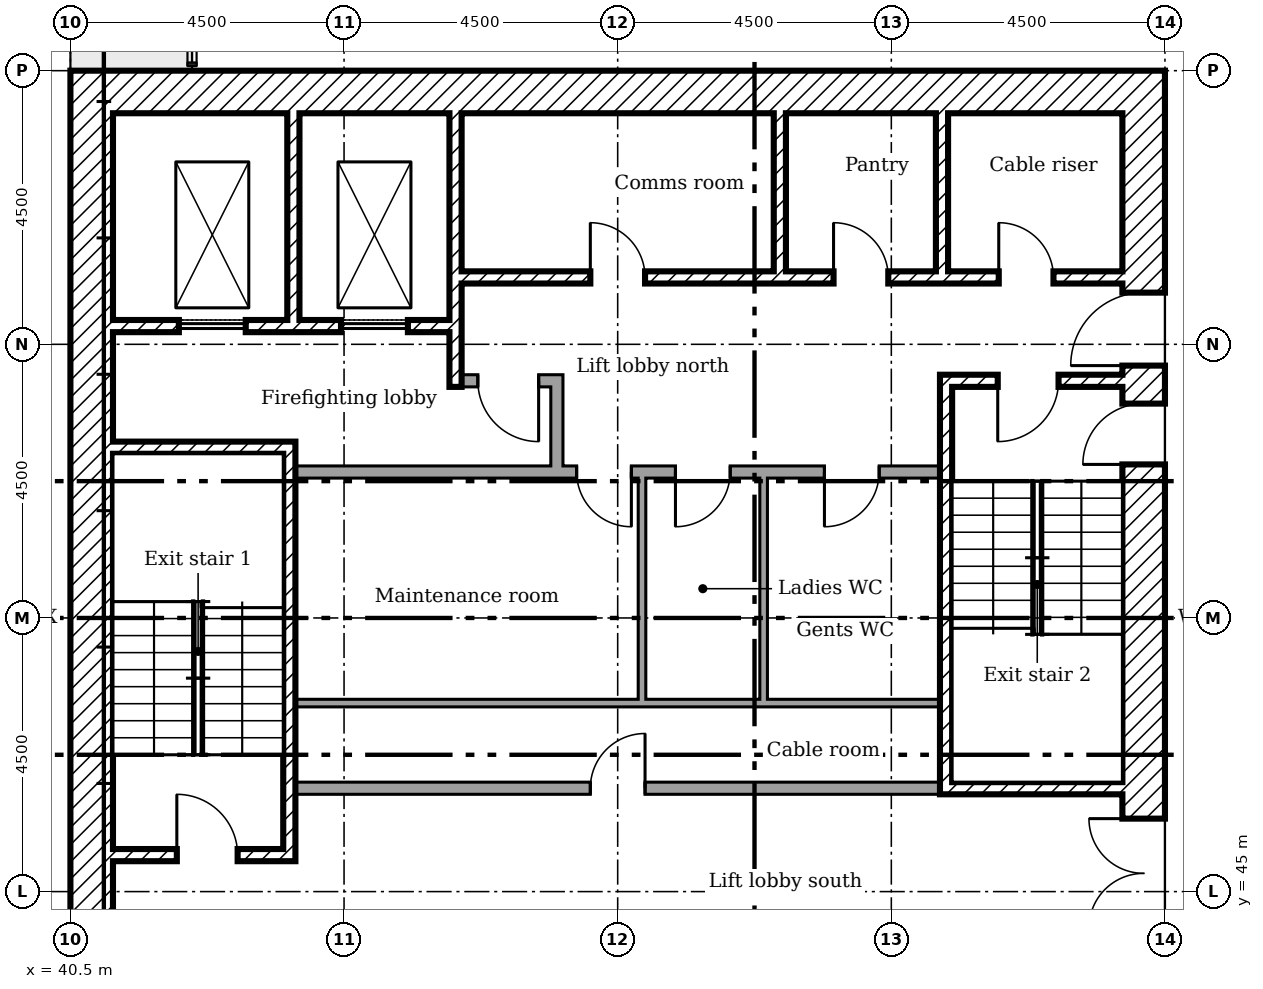
"""IFC4 building model, lengths in metres.
Left out: names, types, materials, properties, quantities, classifications, styles, units other than length and angle.
Written with IfcOpenShell. Run it as: python <this file> out.ifc"""

import sys

from ifc_helpers import new_model, si_unit, direction, frame, frame_2d, origin, place, context, subcontext, project, spatial, rectangle, extrude, element, fill, save


model = new_model("IFC4")
c1 = context("Model", 3, precision=1e-05, world=origin(), true_north=direction((0.0, 1.0)))
c2 = subcontext(c1, "Body", "Model", "MODEL_VIEW")
j1 = project(units=[si_unit("LENGTHUNIT", "METRE"), si_unit("PLANEANGLEUNIT", "RADIAN")], contexts=[c1])
p1 = place(None, origin())
s1 = spatial("IfcSite", under=j1, at=p1, CompositionType="ELEMENT")
p2 = place(p1, origin())
s2 = spatial("IfcBuilding", under=s1, at=p2, CompositionType="ELEMENT")
p3 = place(p2, frame((0.0, 0.0, 102.8)))
s3 = spatial("IfcBuildingStorey", under=s2, at=p3, CompositionType="ELEMENT", Elevation=102.8)
p4 = place(p3, frame((58.15, 40.5, 0.0), z_axis=(0.0, 0.0, 1.0), x_axis=(0.0, 1.0, 0.0)))
e1 = element("IfcWall", 1, at=p4, inside=s3, PredefinedType="SHEAR", context=c2, shape_type="SweptSolid", body=[
    extrude(rectangle(XDim=18.0, YDim=0.7, at=frame_2d((9.0, 0.0))), origin(), (0.0, 0.0, 1.0), 3.35),
])
p5 = place(p4, frame((13.15, 0.0, 0.0)))
e2 = element("IfcOpeningElement", 2, at=p5, cuts=e1, PredefinedType="OPENING", context=c2, shape_type="SweptSolid", body=[
    extrude(rectangle(XDim=1.2, YDim=2.1, at=frame_2d((0.6, 1.05))), frame((0.0, 0.36, 0.0), z_axis=(0.0, -1.0, 0.0), x_axis=(1.0, 0.0, 0.0)), (0.0, 0.0, 1.0), 0.72),
])
p6 = place(p4, frame((3.9, 0.0, 0.0)))
e3 = element("IfcOpeningElement", 3, at=p6, cuts=e1, PredefinedType="OPENING", context=c2, shape_type="SweptSolid", body=[
    extrude(rectangle(XDim=1.8, YDim=2.1, at=frame_2d((0.9, 1.05))), frame((0.0, 0.36, 0.0), z_axis=(0.0, -1.0, 0.0), x_axis=(1.0, 0.0, 0.0)), (0.0, 0.0, 1.0), 0.72),
])
p7 = place(p4, frame((11.525, 0.0, 0.0)))
e4 = element("IfcOpeningElement", 4, at=p7, cuts=e1, PredefinedType="OPENING", context=c2, shape_type="SweptSolid", body=[
    extrude(rectangle(XDim=1.0, YDim=2.1, at=frame_2d((0.5, 1.05))), frame((0.0, 0.36, 0.0), z_axis=(0.0, -1.0, 0.0), x_axis=(1.0, 0.0, 0.0)), (0.0, 0.0, 1.0), 0.72),
])
p8 = place(p3, frame((41.2, 58.15, 0.0)))
e5 = element("IfcWall", 5, at=p8, inside=s3, PredefinedType="SHEAR", context=c2, shape_type="SweptSolid", body=[
    extrude(rectangle(XDim=16.6, YDim=0.7, at=frame_2d((8.3, 0.0))), origin(), (0.0, 0.0, 1.0), 3.35),
])
p9 = place(p3, frame((40.85, 40.5, 0.0), z_axis=(0.0, 0.0, 1.0), x_axis=(0.0, 1.0, 0.0)))
e6 = element("IfcWall", 6, at=p9, inside=s3, PredefinedType="SHEAR", context=c2, shape_type="SweptSolid", body=[
    extrude(rectangle(XDim=18.0, YDim=0.7, at=frame_2d((9.0, 0.0))), origin(), (0.0, 0.0, 1.0), 3.35),
])
p10 = place(p3, frame((44.167, 57.8, 0.0), z_axis=(0.0, 0.0, 1.0), x_axis=(0.0, -1.0, 0.0)))
e7 = element("IfcWall", 7, at=p10, inside=s3, PredefinedType="SHEAR", context=c2, shape_type="SweptSolid", body=[
    extrude(rectangle(XDim=3.4, YDim=0.2, at=frame_2d((1.7, 0.0))), origin(), (0.0, 0.0, 1.0), 3.35),
])
p11 = place(p3, frame((46.833, 57.8, 0.0), z_axis=(0.0, 0.0, 1.0), x_axis=(0.0, -1.0, 0.0)))
e8 = element("IfcWall", 8, at=p11, inside=s3, PredefinedType="SHEAR", context=c2, shape_type="SweptSolid", body=[
    extrude(rectangle(XDim=4.5, YDim=0.2, at=frame_2d((2.25, 0.0))), origin(), (0.0, 0.0, 1.0), 3.35),
])
for number, where, z_axis, x_axis in (
    (9, (52.167, 57.8, 0.0), (0.0, 0.0, 1.0), (0.0, -1.0, 0.0)),
    (10, (54.833, 57.8, 0.0), (0.0, 0.0, 1.0), (0.0, -1.0, 0.0)),
):
    element("IfcWall", number, at=place(p3, frame(where, z_axis=z_axis, x_axis=x_axis)), inside=s3, PredefinedType="SHEAR", context=c2, shape_type="SweptSolid", body=[
        extrude(rectangle(XDim=2.6, YDim=0.2, at=frame_2d((1.3, 0.0))), origin(), (0.0, 0.0, 1.0), 3.35),
    ])
p12 = place(p3, frame((48.5, 51.9, 0.0), z_axis=(0.0, 0.0, 1.0), x_axis=(0.0, 1.0, 0.0)))
e11 = element("IfcWall", 11, at=p12, inside=s3, PredefinedType="PARTITIONING", context=c2, shape_type="SweptSolid", body=[
    extrude(rectangle(XDim=1.6, YDim=0.2, at=frame_2d((0.8, 0.0))), origin(), (0.0, 0.0, 1.0), 3.35),
])
p13 = place(p3, frame((46.933, 53.4, 0.0)))
e12 = element("IfcWall", 12, at=p13, inside=s3, PredefinedType="PARTITIONING", context=c2, shape_type="SweptSolid", body=[
    extrude(rectangle(XDim=1.467, YDim=0.2, at=frame_2d((0.733, 0.0))), origin(), (0.0, 0.0, 1.0), 3.35),
])
p14 = place(p13, frame((0.267, 0.0, 0.0)))
e13 = element("IfcOpeningElement", 13, at=p14, cuts=e12, PredefinedType="OPENING", context=c2, shape_type="SweptSolid", body=[
    extrude(rectangle(XDim=1.0, YDim=2.1, at=frame_2d((0.5, 1.05))), frame((0.0, 0.11, 0.0), z_axis=(0.0, -1.0, 0.0), x_axis=(1.0, 0.0, 0.0)), (0.0, 0.0, 1.0), 0.22),
])
p15 = place(p3, frame((46.933, 55.1, 0.0)))
e14 = element("IfcWall", 14, at=p15, inside=s3, PredefinedType="SHEAR", context=c2, shape_type="SweptSolid", body=[
    extrude(rectangle(XDim=10.867, YDim=0.2, at=frame_2d((5.433, 0.0))), origin(), (0.0, 0.0, 1.0), 3.35),
])
p16 = place(p15, frame((8.833, 0.0, 0.0)))
e15 = element("IfcOpeningElement", 15, at=p16, cuts=e14, PredefinedType="OPENING", context=c2, shape_type="SweptSolid", body=[
    extrude(rectangle(XDim=0.9, YDim=2.1, at=frame_2d((0.45, 1.05))), frame((0.0, 0.11, 0.0), z_axis=(0.0, -1.0, 0.0), x_axis=(1.0, 0.0, 0.0)), (0.0, 0.0, 1.0), 0.22),
])
p17 = place(p15, frame((2.117, 0.0, 0.0)))
e16 = element("IfcOpeningElement", 16, at=p17, cuts=e14, PredefinedType="OPENING", context=c2, shape_type="SweptSolid", body=[
    extrude(rectangle(XDim=0.9, YDim=2.1, at=frame_2d((0.45, 1.05))), frame((0.0, 0.11, 0.0), z_axis=(0.0, -1.0, 0.0), x_axis=(1.0, 0.0, 0.0)), (0.0, 0.0, 1.0), 0.22),
])
p18 = place(p15, frame((6.117, 0.0, 0.0)))
e17 = element("IfcOpeningElement", 17, at=p18, cuts=e14, PredefinedType="OPENING", context=c2, shape_type="SweptSolid", body=[
    extrude(rectangle(XDim=0.9, YDim=2.1, at=frame_2d((0.45, 1.05))), frame((0.0, 0.11, 0.0), z_axis=(0.0, -1.0, 0.0), x_axis=(1.0, 0.0, 0.0)), (0.0, 0.0, 1.0), 0.22),
])
p19 = place(p3, frame((41.2, 54.3, 0.0)))
e18 = element("IfcWall", 18, at=p19, inside=s3, PredefinedType="SHEAR", context=c2, shape_type="SweptSolid", body=[
    extrude(rectangle(XDim=5.533, YDim=0.2, at=frame_2d((2.767, 0.0))), origin(), (0.0, 0.0, 1.0), 3.35),
])
p20 = place(p19, frame((1.083, 0.0, 0.0)))
e19 = element("IfcOpeningElement", 19, at=p20, cuts=e18, PredefinedType="OPENING", context=c2, shape_type="SweptSolid", body=[
    extrude(rectangle(XDim=1.1, YDim=2.1, at=frame_2d((0.55, 1.05))), frame((0.0, 0.11, 0.0), z_axis=(0.0, -1.0, 0.0), x_axis=(1.0, 0.0, 0.0)), (0.0, 0.0, 1.0), 0.22),
])
p21 = place(p19, frame((3.75, 0.0, 0.0)))
e20 = element("IfcOpeningElement", 20, at=p21, cuts=e18, PredefinedType="OPENING", context=c2, shape_type="SweptSolid", body=[
    extrude(rectangle(XDim=1.1, YDim=2.1, at=frame_2d((0.55, 1.05))), frame((0.0, 0.11, 0.0), z_axis=(0.0, -1.0, 0.0), x_axis=(1.0, 0.0, 0.0)), (0.0, 0.0, 1.0), 0.22),
])
p22 = place(p3, frame((44.1, 45.5, 0.0), z_axis=(0.0, 0.0, 1.0), x_axis=(0.0, 1.0, 0.0)))
e21 = element("IfcWall", 21, at=p22, inside=s3, PredefinedType="SHEAR", context=c2, shape_type="SweptSolid", body=[
    extrude(rectangle(XDim=6.9, YDim=0.2, at=frame_2d((3.45, 0.0))), origin(), (0.0, 0.0, 1.0), 3.35),
])
p23 = place(p3, frame((41.2, 52.3, 0.0)))
e22 = element("IfcWall", 22, at=p23, inside=s3, PredefinedType="SHEAR", context=c2, shape_type="SweptSolid", body=[
    extrude(rectangle(XDim=2.8, YDim=0.2, at=frame_2d((1.4, 0.0))), origin(), (0.0, 0.0, 1.0), 3.35),
])
p24 = place(p3, frame((41.2, 45.6, 0.0)))
e23 = element("IfcWall", 23, at=p24, inside=s3, PredefinedType="SHEAR", context=c2, shape_type="SweptSolid", body=[
    extrude(rectangle(XDim=2.8, YDim=0.2, at=frame_2d((1.4, 0.0))), origin(), (0.0, 0.0, 1.0), 3.35),
])
p25 = place(p24, frame((1.05, 0.0, 0.0)))
e24 = element("IfcOpeningElement", 24, at=p25, cuts=e23, PredefinedType="OPENING", context=c2, shape_type="SweptSolid", body=[
    extrude(rectangle(XDim=1.0, YDim=2.1, at=frame_2d((0.5, 1.05))), frame((0.0, 0.11, 0.0), z_axis=(0.0, -1.0, 0.0), x_axis=(1.0, 0.0, 0.0)), (0.0, 0.0, 1.0), 0.22),
])
p26 = place(p3, frame((54.8, 53.4, 0.0)))
e25 = element("IfcWall", 25, at=p26, inside=s3, PredefinedType="SHEAR", context=c2, shape_type="SweptSolid", body=[
    extrude(rectangle(XDim=3.0, YDim=0.2, at=frame_2d((1.5, 0.0))), origin(), (0.0, 0.0, 1.0), 3.35),
])
p27 = place(p26, frame((0.95, 0.0, 0.0)))
e26 = element("IfcOpeningElement", 26, at=p27, cuts=e25, PredefinedType="OPENING", context=c2, shape_type="SweptSolid", body=[
    extrude(rectangle(XDim=1.0, YDim=2.1, at=frame_2d((0.5, 1.05))), frame((0.0, 0.11, 0.0), z_axis=(0.0, -1.0, 0.0), x_axis=(1.0, 0.0, 0.0)), (0.0, 0.0, 1.0), 0.22),
])
p28 = place(p3, frame((54.8, 46.7, 0.0)))
e27 = element("IfcWall", 27, at=p28, inside=s3, PredefinedType="SHEAR", context=c2, shape_type="SweptSolid", body=[
    extrude(rectangle(XDim=3.0, YDim=0.2, at=frame_2d((1.5, 0.0))), origin(), (0.0, 0.0, 1.0), 3.35),
])
p29 = place(p3, frame((54.9, 46.8, 0.0), z_axis=(0.0, 0.0, 1.0), x_axis=(0.0, 1.0, 0.0)))
e28 = element("IfcWall", 28, at=p29, inside=s3, PredefinedType="SHEAR", context=c2, shape_type="SweptSolid", body=[
    extrude(rectangle(XDim=6.5, YDim=0.2, at=frame_2d((3.25, 0.0))), origin(), (0.0, 0.0, 1.0), 3.35),
])
p30 = place(p3, frame((44.2, 51.9, 0.0)))
e29 = element("IfcWall", 29, at=p30, inside=s3, PredefinedType="PARTITIONING", context=c2, shape_type="SweptSolid", body=[
    extrude(rectangle(XDim=10.6, YDim=0.2, at=frame_2d((5.3, 0.0))), origin(), (0.0, 0.0, 1.0), 3.35),
])
p31 = place(p30, frame((4.625, 0.0, 0.0)))
e30 = element("IfcOpeningElement", 30, at=p31, cuts=e29, PredefinedType="OPENING", context=c2, shape_type="SweptSolid", body=[
    extrude(rectangle(XDim=0.9, YDim=2.1, at=frame_2d((0.45, 1.05))), frame((0.0, 0.11, 0.0), z_axis=(0.0, -1.0, 0.0), x_axis=(1.0, 0.0, 0.0)), (0.0, 0.0, 1.0), 0.22),
])
p32 = place(p30, frame((6.25, 0.0, 0.0)))
e31 = element("IfcOpeningElement", 31, at=p32, cuts=e29, PredefinedType="OPENING", context=c2, shape_type="SweptSolid", body=[
    extrude(rectangle(XDim=0.9, YDim=2.1, at=frame_2d((0.45, 1.05))), frame((0.0, 0.11, 0.0), z_axis=(0.0, -1.0, 0.0), x_axis=(1.0, 0.0, 0.0)), (0.0, 0.0, 1.0), 0.22),
])
p33 = place(p30, frame((8.7, 0.0, 0.0)))
e32 = element("IfcOpeningElement", 32, at=p33, cuts=e29, PredefinedType="OPENING", context=c2, shape_type="SweptSolid", body=[
    extrude(rectangle(XDim=0.9, YDim=2.1, at=frame_2d((0.45, 1.05))), frame((0.0, 0.11, 0.0), z_axis=(0.0, -1.0, 0.0), x_axis=(1.0, 0.0, 0.0)), (0.0, 0.0, 1.0), 0.22),
])
p34 = place(p3, frame((44.2, 46.7, 0.0)))
e33 = element("IfcWall", 33, at=p34, inside=s3, PredefinedType="PARTITIONING", context=c2, shape_type="SweptSolid", body=[
    extrude(rectangle(XDim=10.6, YDim=0.2, at=frame_2d((5.3, 0.0))), origin(), (0.0, 0.0, 1.0), 3.35),
])
p35 = place(p34, frame((4.85, 0.0, 0.0)))
e34 = element("IfcOpeningElement", 34, at=p35, cuts=e33, PredefinedType="OPENING", context=c2, shape_type="SweptSolid", body=[
    extrude(rectangle(XDim=0.9, YDim=2.1, at=frame_2d((0.45, 1.05))), frame((0.0, 0.11, 0.0), z_axis=(0.0, -1.0, 0.0), x_axis=(1.0, 0.0, 0.0)), (0.0, 0.0, 1.0), 0.22),
])
p36 = place(p3, frame((49.962, 48.1, 0.0), z_axis=(0.0, 0.0, 1.0), x_axis=(-1.0, 0.0, 0.0)))
e35 = element("IfcWall", 35, at=p36, inside=s3, PredefinedType="PARTITIONING", context=c2, shape_type="SweptSolid", body=[
    extrude(rectangle(XDim=5.762, YDim=0.125, at=frame_2d((2.881, 0.0))), origin(), (0.0, 0.0, 1.0), 3.35),
])
p37 = place(p3, frame((51.962, 48.1, 0.0), z_axis=(0.0, 0.0, 1.0), x_axis=(-1.0, 0.0, 0.0)))
e36 = element("IfcWall", 36, at=p37, inside=s3, PredefinedType="PARTITIONING", context=c2, shape_type="SweptSolid", body=[
    extrude(rectangle(XDim=2.062, YDim=0.125, at=frame_2d((1.031, 0.0))), origin(), (0.0, 0.0, 1.0), 3.35),
])
p38 = place(p3, frame((49.9, 48.163, 0.0), z_axis=(0.0, 0.0, 1.0), x_axis=(0.0, 1.0, 0.0)))
e37 = element("IfcWall", 37, at=p38, inside=s3, PredefinedType="PARTITIONING", context=c2, shape_type="SweptSolid", body=[
    extrude(rectangle(XDim=3.637, YDim=0.125, at=frame_2d((1.819, 0.0))), origin(), (0.0, 0.0, 1.0), 3.35),
])
p39 = place(p3, frame((54.8, 48.1, 0.0), z_axis=(0.0, 0.0, 1.0), x_axis=(-1.0, 0.0, 0.0)))
e38 = element("IfcWall", 38, at=p39, inside=s3, PredefinedType="PARTITIONING", context=c2, shape_type="SweptSolid", body=[
    extrude(rectangle(XDim=2.9, YDim=0.125, at=frame_2d((1.45, 0.0))), origin(), (0.0, 0.0, 1.0), 3.35),
])
p40 = place(p3, frame((51.9, 48.163, 0.0), z_axis=(0.0, 0.0, 1.0), x_axis=(0.0, 1.0, 0.0)))
e39 = element("IfcWall", 39, at=p40, inside=s3, PredefinedType="PARTITIONING", context=c2, shape_type="SweptSolid", body=[
    extrude(rectangle(XDim=3.637, YDim=0.125, at=frame_2d((1.819, 0.0))), origin(), (0.0, 0.0, 1.0), 3.35),
])
p41 = place(p5, origin())
e40 = element("IfcDoor", 40, at=p41, inside=s3, OperationType="SINGLE_SWING_RIGHT", PredefinedType="DOOR", context=c2, shape_type="SweptSolid", body=[
    extrude(rectangle(XDim=1.2, YDim=2.1, at=frame_2d((0.6, 1.05))), frame((0.0, 0.025, 0.0), z_axis=(0.0, -1.0, 0.0), x_axis=(1.0, 0.0, 0.0)), (0.0, 0.0, 1.0), 0.05),
])
fill(e2, e40)
p42 = place(p6, origin())
e41 = element("IfcDoor", 41, at=p42, inside=s3, OperationType="DOUBLE_DOOR_SINGLE_SWING", PredefinedType="DOOR", context=c2, shape_type="SweptSolid", body=[
    extrude(rectangle(XDim=1.8, YDim=2.1, at=frame_2d((0.9, 1.05))), frame((0.0, 0.025, 0.0), z_axis=(0.0, -1.0, 0.0), x_axis=(1.0, 0.0, 0.0)), (0.0, 0.0, 1.0), 0.05),
])
fill(e3, e41)
p43 = place(p25, origin())
e42 = element("IfcDoor", 42, at=p43, inside=s3, OperationType="SINGLE_SWING_RIGHT", PredefinedType="DOOR", context=c2, shape_type="SweptSolid", body=[
    extrude(rectangle(XDim=1.0, YDim=2.1, at=frame_2d((0.5, 1.05))), frame((0.0, 0.025, 0.0), z_axis=(0.0, -1.0, 0.0), x_axis=(1.0, 0.0, 0.0)), (0.0, 0.0, 1.0), 0.05),
])
fill(e24, e42)
p44 = place(p27, frame((1.0, 0.0, 0.0), x_axis=(-1.0, 0.0, 0.0)))
e43 = element("IfcDoor", 43, at=p44, inside=s3, OperationType="SINGLE_SWING_LEFT", PredefinedType="DOOR", context=c2, shape_type="SweptSolid", body=[
    extrude(rectangle(XDim=1.0, YDim=2.1, at=frame_2d((0.5, 1.05))), frame((0.0, 0.025, 0.0), z_axis=(0.0, -1.0, 0.0), x_axis=(1.0, 0.0, 0.0)), (0.0, 0.0, 1.0), 0.05),
])
fill(e26, e43)
p45 = place(p7, origin())
e44 = element("IfcDoor", 44, at=p45, inside=s3, OperationType="SINGLE_SWING_RIGHT", PredefinedType="DOOR", context=c2, shape_type="SweptSolid", body=[
    extrude(rectangle(XDim=1.0, YDim=2.1, at=frame_2d((0.5, 1.05))), frame((0.0, 0.025, 0.0), z_axis=(0.0, -1.0, 0.0), x_axis=(1.0, 0.0, 0.0)), (0.0, 0.0, 1.0), 0.05),
])
fill(e4, e44)
p46 = place(p14, frame((1.0, 0.0, 0.0), x_axis=(-1.0, 0.0, 0.0)))
e45 = element("IfcDoor", 45, at=p46, inside=s3, OperationType="SINGLE_SWING_RIGHT", PredefinedType="DOOR", context=c2, shape_type="SweptSolid", body=[
    extrude(rectangle(XDim=1.0, YDim=2.1, at=frame_2d((0.5, 1.05))), frame((0.0, 0.025, 0.0), z_axis=(0.0, -1.0, 0.0), x_axis=(1.0, 0.0, 0.0)), (0.0, 0.0, 1.0), 0.05),
])
fill(e13, e45)
p47 = place(p16, origin())
e46 = element("IfcDoor", 46, at=p47, inside=s3, OperationType="SINGLE_SWING_RIGHT", PredefinedType="DOOR", context=c2, shape_type="SweptSolid", body=[
    extrude(rectangle(XDim=0.9, YDim=2.1, at=frame_2d((0.45, 1.05))), frame((0.0, 0.025, 0.0), z_axis=(0.0, -1.0, 0.0), x_axis=(1.0, 0.0, 0.0)), (0.0, 0.0, 1.0), 0.05),
])
fill(e15, e46)
p48 = place(p17, origin())
e47 = element("IfcDoor", 47, at=p48, inside=s3, OperationType="SINGLE_SWING_RIGHT", PredefinedType="DOOR", context=c2, shape_type="SweptSolid", body=[
    extrude(rectangle(XDim=0.9, YDim=2.1, at=frame_2d((0.45, 1.05))), frame((0.0, 0.025, 0.0), z_axis=(0.0, -1.0, 0.0), x_axis=(1.0, 0.0, 0.0)), (0.0, 0.0, 1.0), 0.05),
])
fill(e16, e47)
p49 = place(p18, origin())
e48 = element("IfcDoor", 48, at=p49, inside=s3, OperationType="SINGLE_SWING_RIGHT", PredefinedType="DOOR", context=c2, shape_type="SweptSolid", body=[
    extrude(rectangle(XDim=0.9, YDim=2.1, at=frame_2d((0.45, 1.05))), frame((0.0, 0.025, 0.0), z_axis=(0.0, -1.0, 0.0), x_axis=(1.0, 0.0, 0.0)), (0.0, 0.0, 1.0), 0.05),
])
fill(e17, e48)
p50 = place(p35, origin())
e49 = element("IfcDoor", 49, at=p50, inside=s3, OperationType="SINGLE_SWING_LEFT", PredefinedType="DOOR", context=c2, shape_type="SweptSolid", body=[
    extrude(rectangle(XDim=0.9, YDim=2.1, at=frame_2d((0.45, 1.05))), frame((0.0, 0.025, 0.0), z_axis=(0.0, -1.0, 0.0), x_axis=(1.0, 0.0, 0.0)), (0.0, 0.0, 1.0), 0.05),
])
fill(e34, e49)
p51 = place(p31, frame((0.9, 0.0, 0.0), x_axis=(-1.0, 0.0, 0.0)))
e50 = element("IfcDoor", 50, at=p51, inside=s3, OperationType="SINGLE_SWING_RIGHT", PredefinedType="DOOR", context=c2, shape_type="SweptSolid", body=[
    extrude(rectangle(XDim=0.9, YDim=2.1, at=frame_2d((0.45, 1.05))), frame((0.0, 0.025, 0.0), z_axis=(0.0, -1.0, 0.0), x_axis=(1.0, 0.0, 0.0)), (0.0, 0.0, 1.0), 0.05),
])
fill(e30, e50)
p52 = place(p32, frame((0.9, 0.0, 0.0), x_axis=(-1.0, 0.0, 0.0)))
e51 = element("IfcDoor", 51, at=p52, inside=s3, OperationType="SINGLE_SWING_LEFT", PredefinedType="DOOR", context=c2, shape_type="SweptSolid", body=[
    extrude(rectangle(XDim=0.9, YDim=2.1, at=frame_2d((0.45, 1.05))), frame((0.0, 0.025, 0.0), z_axis=(0.0, -1.0, 0.0), x_axis=(1.0, 0.0, 0.0)), (0.0, 0.0, 1.0), 0.05),
])
fill(e31, e51)
p53 = place(p33, frame((0.9, 0.0, 0.0), x_axis=(-1.0, 0.0, 0.0)))
e52 = element("IfcDoor", 52, at=p53, inside=s3, OperationType="SINGLE_SWING_LEFT", PredefinedType="DOOR", context=c2, shape_type="SweptSolid", body=[
    extrude(rectangle(XDim=0.9, YDim=2.1, at=frame_2d((0.45, 1.05))), frame((0.0, 0.025, 0.0), z_axis=(0.0, -1.0, 0.0), x_axis=(1.0, 0.0, 0.0)), (0.0, 0.0, 1.0), 0.05),
])
fill(e32, e52)
p54 = place(p20, origin())
e53 = element("IfcDoor", 53, at=p54, inside=s3, OperationType="SLIDING_TO_LEFT", PredefinedType="DOOR", context=c2, shape_type="SweptSolid", body=[
    extrude(rectangle(XDim=1.1, YDim=2.1, at=frame_2d((0.55, 1.05))), frame((0.0, 0.025, 0.0), z_axis=(0.0, -1.0, 0.0), x_axis=(1.0, 0.0, 0.0)), (0.0, 0.0, 1.0), 0.05),
])
fill(e19, e53)
p55 = place(p21, origin())
e54 = element("IfcDoor", 54, at=p55, inside=s3, OperationType="SLIDING_TO_LEFT", PredefinedType="DOOR", context=c2, shape_type="SweptSolid", body=[
    extrude(rectangle(XDim=1.1, YDim=2.1, at=frame_2d((0.55, 1.05))), frame((0.0, 0.025, 0.0), z_axis=(0.0, -1.0, 0.0), x_axis=(1.0, 0.0, 0.0)), (0.0, 0.0, 1.0), 0.05),
])
fill(e20, e54)
save(model, sys.argv[1])
